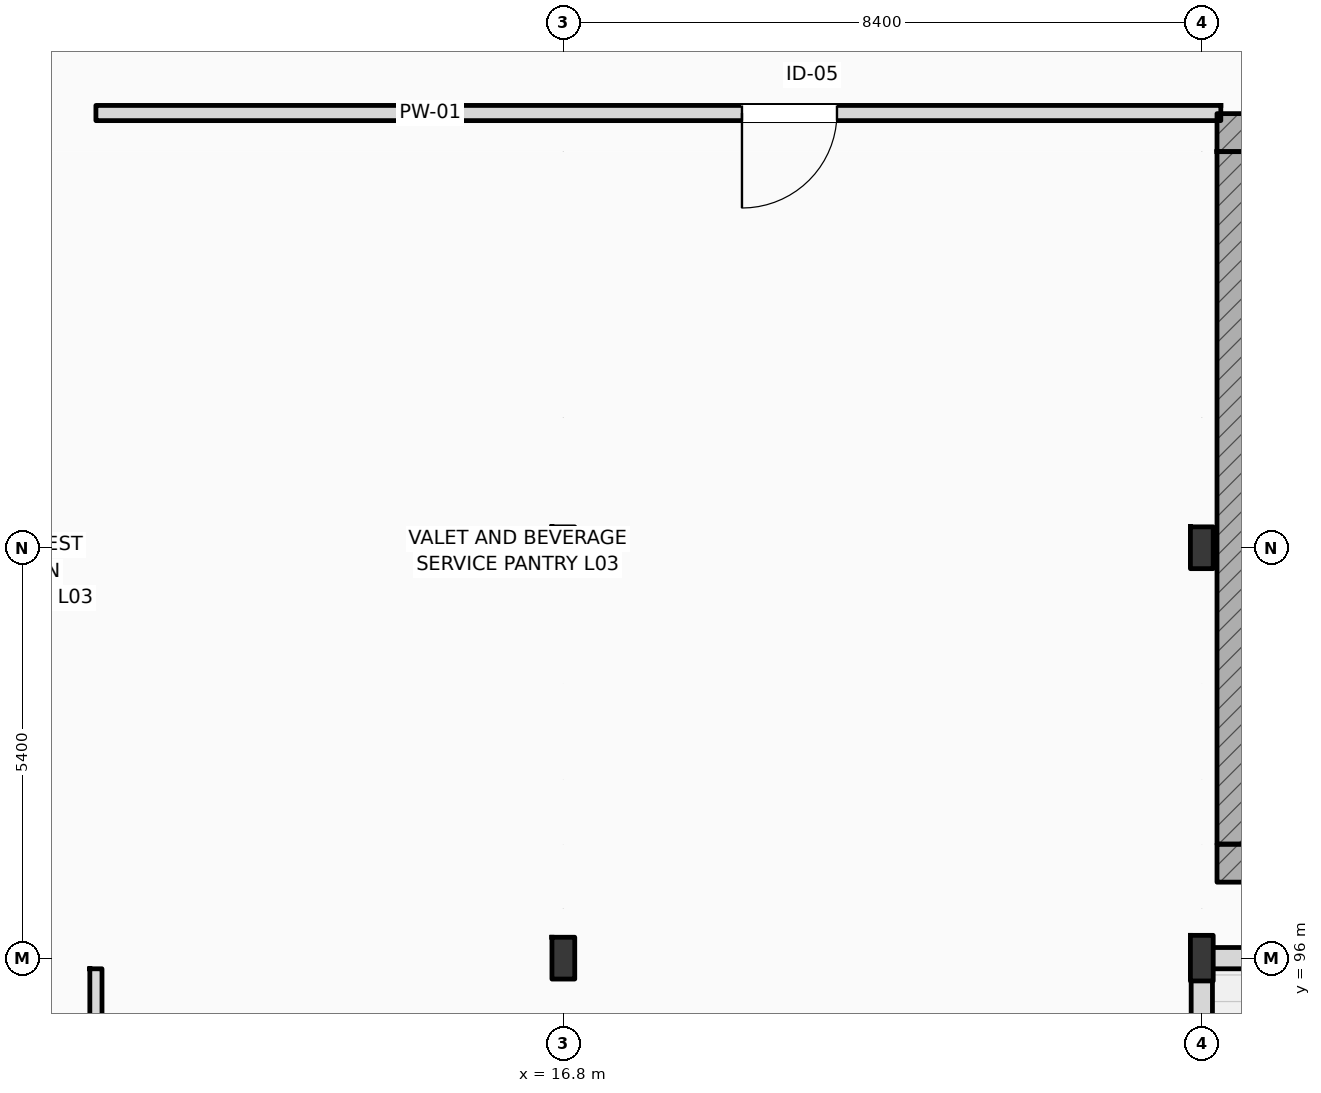
"""IFC4 building model, lengths in metres.
Left out: names, types, materials, properties, quantities, classifications, styles, units other than length and angle.
Written with IfcOpenShell. Run it as: python <this file> out.ifc"""

import sys

from ifc_helpers import new_model, si_unit, direction, frame, frame_2d, origin, origin_2d, place, context, subcontext, project, spatial, rectangle, i_section, extrude, element, fill, save


model = new_model("IFC4")
c1 = context("Model", 3, precision=1e-05, world=origin(), true_north=direction((0.0, 1.0)))
c2 = subcontext(c1, "Body", "Model", "MODEL_VIEW")
j1 = project(units=[si_unit("LENGTHUNIT", "METRE"), si_unit("PLANEANGLEUNIT", "RADIAN")], contexts=[c1])
p1 = place(None, origin())
s1 = spatial("IfcSite", under=j1, at=p1, CompositionType="ELEMENT")
p2 = place(p1, origin())
s2 = spatial("IfcBuilding", under=s1, at=p2, CompositionType="ELEMENT")
p3 = place(p2, frame((0.0, 0.0, 16.2)))
s3 = spatial("IfcBuildingStorey", under=s2, at=p3, CompositionType="ELEMENT", Elevation=16.2)
p4 = place(p3, frame((16.8, 96.0, 0.0), z_axis=(0.0, 0.0, 1.0), x_axis=(1.0, 0.0, 0.0)))
e1 = element("IfcColumn", 1, at=p4, inside=s3, PredefinedType="COLUMN", context=c2, shape_type="SweptSolid", body=[
    extrude(i_section(OverallWidth=0.3, OverallDepth=0.55, WebThickness=0.015, FlangeThickness=0.029, FilletRadius=0.027, at=origin_2d()), origin(), (0.0, 0.0, 1.0), 4.2),
])
p5 = place(p3, frame((25.2, 96.0, 0.0), z_axis=(0.0, 0.0, 1.0), x_axis=(1.0, 0.0, 0.0)))
e2 = element("IfcColumn", 2, at=p5, inside=s3, PredefinedType="COLUMN", context=c2, shape_type="SweptSolid", body=[
    extrude(i_section(OverallWidth=0.3, OverallDepth=0.6, WebThickness=0.015, FlangeThickness=0.03, FilletRadius=0.027, at=origin_2d()), origin(), (0.0, 0.0, 1.0), 4.2),
])
for number, where, z_axis, x_axis in (
    (3, (16.8, 101.4, 0.0), (0.0, 0.0, 1.0), (1.0, 0.0, 0.0)),
    (4, (25.2, 101.4, 0.0), (0.0, 0.0, 1.0), (1.0, 0.0, 0.0)),
):
    element("IfcColumn", number, at=place(p3, frame(where, z_axis=z_axis, x_axis=x_axis)), inside=s3, PredefinedType="COLUMN", context=c2, shape_type="SweptSolid", body=[
        extrude(i_section(OverallWidth=0.3, OverallDepth=0.55, WebThickness=0.015, FlangeThickness=0.029, FilletRadius=0.027, at=origin_2d()), origin(), (0.0, 0.0, 1.0), 4.2),
    ])
for number, where, z_axis, x_axis in (
    (5, (25.4, 106.862, 0.0), (0.0, 0.0, 1.0), (1.0, 0.0, 0.0)),
    (6, (25.4, 97.25, 0.0), (0.0, 0.0, 1.0), (1.0, 0.0, 0.0)),
):
    element("IfcWall", number, at=place(p3, frame(where, z_axis=z_axis, x_axis=x_axis)), inside=s3, PredefinedType="SHEAR", context=c2, shape_type="SweptSolid", body=[
        extrude(rectangle(XDim=5.16, YDim=0.5, at=frame_2d((2.58, 0.0))), origin(), (0.0, 0.0, 1.0), 4.2),
    ])
p6 = place(p3, frame((25.65, 97.5, 0.0), z_axis=(0.0, 0.0, 1.0), x_axis=(0.0, 1.0, 0.0)))
e7 = element("IfcWall", 7, at=p6, inside=s3, PredefinedType="SHEAR", context=c2, shape_type="SweptSolid", body=[
    extrude(rectangle(XDim=9.112, YDim=0.5, at=frame_2d((4.556, 0.0))), origin(), (0.0, 0.0, 1.0), 4.2),
])
p7 = place(p3, frame((25.2, 96.0, 0.0), z_axis=(0.0, 0.0, 1.0), x_axis=(1.0, 0.0, 0.0)))
e8 = element("IfcWall", 8, at=p7, inside=s3, PredefinedType="STANDARD", context=c2, shape_type="SweptSolid", body=[
    extrude(rectangle(XDim=23.4, YDim=0.28, at=frame_2d((11.7, 0.0))), origin(), (0.0, 0.0, 1.0), 3.46),
])
p8 = place(p3, frame((25.2, 79.5, 0.0), z_axis=(0.0, 0.0, 1.0), x_axis=(0.0, 1.0, 0.0)))
e9 = element("IfcWall", 9, at=p8, inside=s3, PredefinedType="STANDARD", context=c2, shape_type="SweptSolid", body=[
    extrude(rectangle(XDim=16.5, YDim=0.28, at=frame_2d((8.25, 0.0))), origin(), (0.0, 0.0, 1.0), 3.51),
])
p9 = place(p3, frame((10.65, 107.12, 0.0), z_axis=(0.0, 0.0, 1.0), x_axis=(1.0, 0.0, 0.0)))
e10 = element("IfcWall", 10, at=p9, inside=s3, PredefinedType="PARTITIONING", context=c2, shape_type="SweptSolid", body=[
    extrude(rectangle(XDim=14.8, YDim=0.2, at=frame_2d((7.4, 0.0))), origin(), (0.0, 0.0, 1.0), 3.92),
])
p10 = place(p9, frame((8.5, 0.0, 0.0)))
e11 = element("IfcOpeningElement", 11, at=p10, cuts=e10, PredefinedType="OPENING", context=c2, shape_type="SweptSolid", body=[
    extrude(rectangle(XDim=1.25, YDim=2.15, at=frame_2d((0.625, 1.075))), frame((0.0, 0.11, 0.0), z_axis=(0.0, -1.0, 0.0), x_axis=(1.0, 0.0, 0.0)), (0.0, 0.0, 1.0), 0.22),
])
p11 = place(p3, frame((10.65, 91.28, 0.0), z_axis=(0.0, 0.0, 1.0), x_axis=(0.0, 1.0, 0.0)))
e12 = element("IfcWall", 12, at=p11, inside=s3, PredefinedType="PARTITIONING", context=c2, shape_type="SweptSolid", body=[
    extrude(rectangle(XDim=4.58, YDim=0.16, at=frame_2d((2.29, 0.0))), origin(), (0.0, 0.0, 1.0), 3.92),
])
p12 = place(p11, frame((2.0, 0.0, 0.0)))
e13 = element("IfcOpeningElement", 13, at=p12, cuts=e12, PredefinedType="OPENING", context=c2, shape_type="SweptSolid", body=[
    extrude(rectangle(XDim=0.9, YDim=2.1, at=frame_2d((0.45, 1.05))), frame((0.0, 0.09, 0.0), z_axis=(0.0, -1.0, 0.0), x_axis=(1.0, 0.0, 0.0)), (0.0, 0.0, 1.0), 0.18),
])
p13 = place(p10, frame((1.25, 0.0, 0.0), z_axis=(0.0, 0.0, 1.0), x_axis=(-1.0, 0.0, 0.0)))
e14 = element("IfcDoor", 14, at=p13, inside=s3, OperationType="SINGLE_SWING_LEFT", PredefinedType="DOOR", context=c2, shape_type="SweptSolid", body=[
    extrude(rectangle(XDim=1.25, YDim=2.15, at=frame_2d((0.625, 1.075))), frame((0.0, 0.025, 0.0), z_axis=(0.0, -1.0, 0.0), x_axis=(1.0, 0.0, 0.0)), (0.0, 0.0, 1.0), 0.05),
])
fill(e11, e14)
save(model, sys.argv[1])
